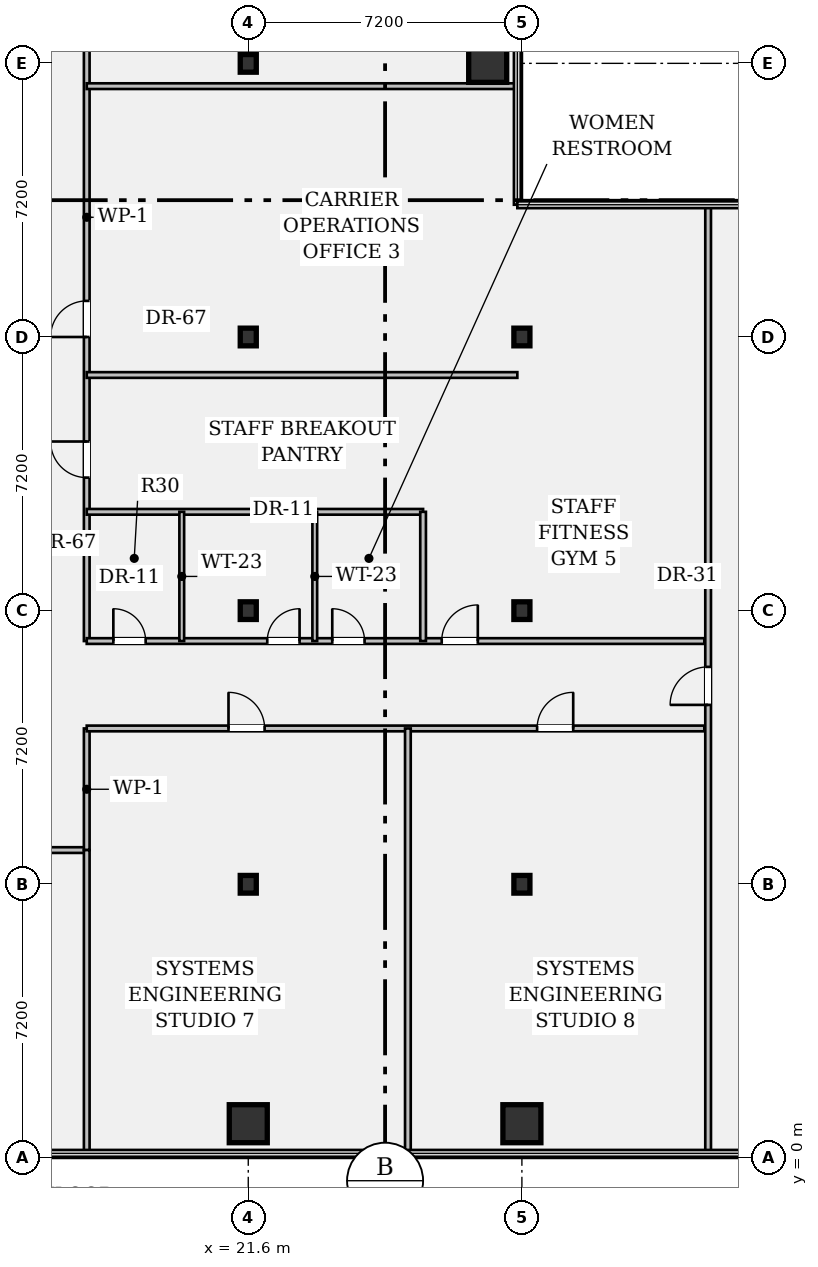
"""IFC4 building model, lengths in metres.
Left out: names, types, materials, properties, quantities, classifications, styles, units other than length and angle.
Written with IfcOpenShell. Run it as: python <this file> out.ifc"""

import sys

from ifc_helpers import new_model, si_unit, direction, frame, frame_2d, origin, origin_2d, place, context, subcontext, project, spatial, rectangle, hollow_rectangle, i_section, extrude, element, fill, save


model = new_model("IFC4")
c1 = context("Model", 3, precision=1e-05, world=origin(), true_north=direction((0.0, 1.0)))
c2 = subcontext(c1, "Body", "Model", "MODEL_VIEW")
j1 = project(units=[si_unit("LENGTHUNIT", "METRE"), si_unit("PLANEANGLEUNIT", "RADIAN")], contexts=[c1])
p1 = place(None, origin())
s1 = spatial("IfcSite", under=j1, at=p1, CompositionType="ELEMENT")
p2 = place(p1, origin())
s2 = spatial("IfcBuilding", under=s1, at=p2, CompositionType="ELEMENT")
p3 = place(p2, frame((0.0, 0.0, 65.8)))
s3 = spatial("IfcBuildingStorey", under=s2, at=p3, CompositionType="ELEMENT", Elevation=65.8)
p4 = place(p3, frame((21.6, 0.9, 0.0), z_axis=(0.0, 0.0, 1.0), x_axis=(1.0, 0.0, 0.0)))
e1 = element("IfcColumn", 1, at=p4, inside=s3, PredefinedType="COLUMN", context=c2, shape_type="SweptSolid", body=[
    extrude(hollow_rectangle(XDim=1.0, YDim=1.0, WallThickness=0.065, at=origin_2d()), origin(), (0.0, 0.0, 1.0), 3.57),
])
for number, where, z_axis, x_axis in (
    (2, (21.6, 7.2, 0.0), (0.0, 0.0, 1.0), (1.0, 0.0, 0.0)),
    (3, (21.6, 14.4, 0.0), (0.0, 0.0, 1.0), (1.0, 0.0, 0.0)),
    (4, (21.6, 21.6, 0.0), (0.0, 0.0, 1.0), (1.0, 0.0, 0.0)),
    (5, (21.6, 28.8, 0.0), (0.0, 0.0, 1.0), (1.0, 0.0, 0.0)),
):
    element("IfcColumn", number, at=place(p3, frame(where, z_axis=z_axis, x_axis=x_axis)), inside=s3, PredefinedType="COLUMN", context=c2, shape_type="SweptSolid", body=[
        extrude(i_section(OverallWidth=0.422, OverallDepth=0.465, WebThickness=0.045, FlangeThickness=0.073, FilletRadius=0.018, at=origin_2d()), origin(), (0.0, 0.0, 1.0), 3.57),
    ])
for number, where, z_axis, x_axis in (
    (6, (27.9, 28.8, 0.0), (0.0, 0.0, 1.0), (1.0, 0.0, 0.0)),
    (7, (28.8, 0.9, 0.0), (0.0, 0.0, 1.0), (1.0, 0.0, 0.0)),
):
    element("IfcColumn", number, at=place(p3, frame(where, z_axis=z_axis, x_axis=x_axis)), inside=s3, PredefinedType="COLUMN", context=c2, shape_type="SweptSolid", body=[
        extrude(hollow_rectangle(XDim=1.0, YDim=1.0, WallThickness=0.065, at=origin_2d()), origin(), (0.0, 0.0, 1.0), 3.57),
    ])
for number, where, z_axis, x_axis in (
    (8, (28.8, 7.2, 0.0), (0.0, 0.0, 1.0), (1.0, 0.0, 0.0)),
    (9, (28.8, 14.4, 0.0), (0.0, 0.0, 1.0), (1.0, 0.0, 0.0)),
    (10, (28.8, 21.6, 0.0), (0.0, 0.0, 1.0), (1.0, 0.0, 0.0)),
):
    element("IfcColumn", number, at=place(p3, frame(where, z_axis=z_axis, x_axis=x_axis)), inside=s3, PredefinedType="COLUMN", context=c2, shape_type="SweptSolid", body=[
        extrude(i_section(OverallWidth=0.422, OverallDepth=0.465, WebThickness=0.045, FlangeThickness=0.073, FilletRadius=0.018, at=origin_2d()), origin(), (0.0, 0.0, 1.0), 3.57),
    ])
p5 = place(p3, frame((14.4, 8.1, 0.0), z_axis=(0.0, 0.0, 1.0), x_axis=(1.0, 0.0, 0.0)))
e11 = element("IfcWall", 11, at=p5, inside=s3, PredefinedType="PARTITIONING", context=c2, shape_type="SweptSolid", body=[
    extrude(rectangle(XDim=2.95, YDim=0.15, at=frame_2d((1.475, 0.0))), origin(), (0.0, 0.0, 1.0), 3.088),
])
p6 = place(p5, frame((0.95, 0.0, 0.0)))
e12 = element("IfcOpeningElement", 12, at=p6, cuts=e11, PredefinedType="OPENING", context=c2, shape_type="SweptSolid", body=[
    extrude(rectangle(XDim=0.95, YDim=2.15, at=frame_2d((0.475, 1.075))), frame((0.0, 0.087, 0.0), z_axis=(0.0, -1.0, 0.0), x_axis=(1.0, 0.0, 0.0)), (0.0, 0.0, 1.0), 0.174),
])
p7 = place(p3, frame((17.35, 8.1, 0.0), z_axis=(0.0, 0.0, 1.0), x_axis=(0.0, 1.0, 0.0)))
e13 = element("IfcWall", 13, at=p7, inside=s3, PredefinedType="PARTITIONING", context=c2, shape_type="SweptSolid", body=[
    extrude(rectangle(XDim=3.2, YDim=0.15, at=frame_2d((1.6, 0.0))), origin(), (0.0, 0.0, 1.0), 3.57),
])
p8 = place(p3, frame((17.35, 13.6, 0.0), z_axis=(0.0, 0.0, 1.0), x_axis=(0.0, 1.0, 0.0)))
e14 = element("IfcWall", 14, at=p8, inside=s3, PredefinedType="PARTITIONING", context=c2, shape_type="SweptSolid", body=[
    extrude(rectangle(XDim=22.3, YDim=0.15, at=frame_2d((11.15, 0.0))), origin(), (0.0, 0.0, 1.0), 2.699),
])
p9 = place(p8, frame((4.3, 0.0, 0.0)))
e15 = element("IfcOpeningElement", 15, at=p9, cuts=e14, PredefinedType="OPENING", context=c2, shape_type="SweptSolid", body=[
    extrude(rectangle(XDim=0.95, YDim=2.15, at=frame_2d((0.475, 1.075))), frame((0.0, 0.087, 0.0), z_axis=(0.0, -1.0, 0.0), x_axis=(1.0, 0.0, 0.0)), (0.0, 0.0, 1.0), 0.174),
])
p10 = place(p8, frame((8.0, 0.0, 0.0)))
e16 = element("IfcOpeningElement", 16, at=p10, cuts=e14, PredefinedType="OPENING", context=c2, shape_type="SweptSolid", body=[
    extrude(rectangle(XDim=0.95, YDim=2.15, at=frame_2d((0.475, 1.075))), frame((0.0, 0.087, 0.0), z_axis=(0.0, -1.0, 0.0), x_axis=(1.0, 0.0, 0.0)), (0.0, 0.0, 1.0), 0.174),
])
p11 = place(p8, frame((15.6, 0.0, 0.0)))
e17 = element("IfcOpeningElement", 17, at=p11, cuts=e14, PredefinedType="OPENING", context=c2, shape_type="SweptSolid", body=[
    extrude(rectangle(XDim=0.95, YDim=2.15, at=frame_2d((0.475, 1.075))), frame((0.0, 0.087, 0.0), z_axis=(0.0, -1.0, 0.0), x_axis=(1.0, 0.0, 0.0)), (0.0, 0.0, 1.0), 0.174),
])
p12 = place(p3, frame((17.35, 11.3, 0.0), z_axis=(0.0, 0.0, 1.0), x_axis=(1.0, 0.0, 0.0)))
e18 = element("IfcWall", 18, at=p12, inside=s3, PredefinedType="PARTITIONING", context=c2, shape_type="SweptSolid", body=[
    extrude(rectangle(XDim=16.25, YDim=0.15, at=frame_2d((8.125, 0.0))), origin(), (0.0, 0.0, 1.0), 2.699),
])
p13 = place(p12, frame((3.73, 0.0, 0.0)))
e19 = element("IfcOpeningElement", 19, at=p13, cuts=e18, PredefinedType="OPENING", context=c2, shape_type="SweptSolid", body=[
    extrude(rectangle(XDim=0.95, YDim=2.15, at=frame_2d((0.475, 1.075))), frame((0.0, 0.087, 0.0), z_axis=(0.0, -1.0, 0.0), x_axis=(1.0, 0.0, 0.0)), (0.0, 0.0, 1.0), 0.174),
])
p14 = place(p12, frame((11.85, 0.0, 0.0)))
e20 = element("IfcOpeningElement", 20, at=p14, cuts=e18, PredefinedType="OPENING", context=c2, shape_type="SweptSolid", body=[
    extrude(rectangle(XDim=0.95, YDim=2.15, at=frame_2d((0.475, 1.075))), frame((0.0, 0.087, 0.0), z_axis=(0.0, -1.0, 0.0), x_axis=(1.0, 0.0, 0.0)), (0.0, 0.0, 1.0), 0.174),
])
p15 = place(p3, frame((17.35, 13.6, 0.0), z_axis=(0.0, 0.0, 1.0), x_axis=(1.0, 0.0, 0.0)))
e21 = element("IfcWall", 21, at=p15, inside=s3, PredefinedType="PARTITIONING", context=c2, shape_type="SweptSolid", body=[
    extrude(rectangle(XDim=16.25, YDim=0.15, at=frame_2d((8.125, 0.0))), origin(), (0.0, 0.0, 1.0), 2.699),
])
p16 = place(p15, frame((0.7, 0.0, 0.0)))
e22 = element("IfcOpeningElement", 22, at=p16, cuts=e21, PredefinedType="OPENING", context=c2, shape_type="SweptSolid", body=[
    extrude(rectangle(XDim=0.85, YDim=2.15, at=frame_2d((0.425, 1.075))), frame((0.0, 0.087, 0.0), z_axis=(0.0, -1.0, 0.0), x_axis=(1.0, 0.0, 0.0)), (0.0, 0.0, 1.0), 0.174),
])
p17 = place(p15, frame((4.75, 0.0, 0.0)))
e23 = element("IfcOpeningElement", 23, at=p17, cuts=e21, PredefinedType="OPENING", context=c2, shape_type="SweptSolid", body=[
    extrude(rectangle(XDim=0.85, YDim=2.15, at=frame_2d((0.425, 1.075))), frame((0.0, 0.087, 0.0), z_axis=(0.0, -1.0, 0.0), x_axis=(1.0, 0.0, 0.0)), (0.0, 0.0, 1.0), 0.174),
])
p18 = place(p15, frame((6.46, 0.0, 0.0)))
e24 = element("IfcOpeningElement", 24, at=p18, cuts=e21, PredefinedType="OPENING", context=c2, shape_type="SweptSolid", body=[
    extrude(rectangle(XDim=0.85, YDim=2.15, at=frame_2d((0.425, 1.075))), frame((0.0, 0.087, 0.0), z_axis=(0.0, -1.0, 0.0), x_axis=(1.0, 0.0, 0.0)), (0.0, 0.0, 1.0), 0.174),
])
p19 = place(p15, frame((9.34, 0.0, 0.0)))
e25 = element("IfcOpeningElement", 25, at=p19, cuts=e21, PredefinedType="OPENING", context=c2, shape_type="SweptSolid", body=[
    extrude(rectangle(XDim=0.95, YDim=2.15, at=frame_2d((0.475, 1.075))), frame((0.0, 0.087, 0.0), z_axis=(0.0, -1.0, 0.0), x_axis=(1.0, 0.0, 0.0)), (0.0, 0.0, 1.0), 0.174),
])
p20 = place(p3, frame((33.7, 0.12, 0.0), z_axis=(0.0, 0.0, 1.0), x_axis=(0.0, 1.0, 0.0)))
e26 = element("IfcWall", 26, at=p20, inside=s3, PredefinedType="PARTITIONING", context=c2, shape_type="SweptSolid", body=[
    extrude(rectangle(XDim=24.96, YDim=0.15, at=frame_2d((12.48, 0.0))), origin(), (0.0, 0.0, 1.0), 2.699),
])
p21 = place(p20, frame((11.8, 0.0, 0.0)))
e27 = element("IfcOpeningElement", 27, at=p21, cuts=e26, PredefinedType="OPENING", context=c2, shape_type="SweptSolid", body=[
    extrude(rectangle(XDim=1.0, YDim=2.15, at=frame_2d((0.5, 1.075))), frame((0.0, 0.087, 0.0), z_axis=(0.0, -1.0, 0.0), x_axis=(1.0, 0.0, 0.0)), (0.0, 0.0, 1.0), 0.174),
])
p22 = place(p3, frame((17.35, 17.0, 0.0), z_axis=(0.0, 0.0, 1.0), x_axis=(1.0, 0.0, 0.0)))
e28 = element("IfcWall", 28, at=p22, inside=s3, PredefinedType="PARTITIONING", context=c2, shape_type="SweptSolid", body=[
    extrude(rectangle(XDim=8.85, YDim=0.15, at=frame_2d((4.425, 0.0))), origin(), (0.0, 0.0, 1.0), 2.699),
])
p23 = place(p3, frame((26.2, 13.6, 0.0), z_axis=(0.0, 0.0, 1.0), x_axis=(0.0, 1.0, 0.0)))
e29 = element("IfcWall", 29, at=p23, inside=s3, PredefinedType="PARTITIONING", context=c2, shape_type="SweptSolid", body=[
    extrude(rectangle(XDim=3.4, YDim=0.15, at=frame_2d((1.7, 0.0))), origin(), (0.0, 0.0, 1.0), 2.699),
])
for number, where, z_axis, x_axis in (
    (30, (19.85, 13.6, 0.0), (0.0, 0.0, 1.0), (0.0, 1.0, 0.0)),
    (31, (23.35, 13.6, 0.0), (0.0, 0.0, 1.0), (0.0, 1.0, 0.0)),
):
    element("IfcWall", number, at=place(p3, frame(where, z_axis=z_axis, x_axis=x_axis)), inside=s3, PredefinedType="PARTITIONING", context=c2, shape_type="SweptSolid", body=[
        extrude(rectangle(XDim=3.4, YDim=0.125, at=frame_2d((1.7, 0.0))), origin(), (0.0, 0.0, 1.0), 2.699),
    ])
for number, where, z_axis, x_axis in (
    (32, (17.35, 20.6, 0.0), (0.0, 0.0, 1.0), (1.0, 0.0, 0.0)),
    (33, (17.35, 28.2, 0.0), (0.0, 0.0, 1.0), (1.0, 0.0, 0.0)),
):
    element("IfcWall", number, at=place(p3, frame(where, z_axis=z_axis, x_axis=x_axis)), inside=s3, PredefinedType="PARTITIONING", context=c2, shape_type="SweptSolid", body=[
        extrude(rectangle(XDim=11.33, YDim=0.15, at=frame_2d((5.665, 0.0))), origin(), (0.0, 0.0, 1.0), 2.699),
    ])
p24 = place(p3, frame((17.35, 0.12, 0.0), z_axis=(0.0, 0.0, 1.0), x_axis=(0.0, 1.0, 0.0)))
e34 = element("IfcWall", 34, at=p24, inside=s3, PredefinedType="PARTITIONING", context=c2, shape_type="SweptSolid", body=[
    extrude(rectangle(XDim=7.98, YDim=0.15, at=frame_2d((3.99, 0.0))), origin(), (0.0, 0.0, 1.0), 2.699),
])
p25 = place(p3, frame((25.8, 0.12, 0.0), z_axis=(0.0, 0.0, 1.0), x_axis=(0.0, 1.0, 0.0)))
e35 = element("IfcWall", 35, at=p25, inside=s3, PredefinedType="PARTITIONING", context=c2, shape_type="SweptSolid", body=[
    extrude(rectangle(XDim=11.18, YDim=0.15, at=frame_2d((5.59, 0.0))), origin(), (0.0, 0.0, 1.0), 2.699),
])
p26 = place(p16, origin())
e36 = element("IfcDoor", 36, at=p26, inside=s3, OperationType="SINGLE_SWING_LEFT", PredefinedType="DOOR", context=c2, shape_type="SweptSolid", body=[
    extrude(rectangle(XDim=0.85, YDim=2.15, at=frame_2d((0.425, 1.075))), frame((0.0, 0.025, 0.0), z_axis=(0.0, -1.0, 0.0), x_axis=(1.0, 0.0, 0.0)), (0.0, 0.0, 1.0), 0.05),
])
fill(e22, e36)
p27 = place(p17, origin())
e37 = element("IfcDoor", 37, at=p27, inside=s3, OperationType="SINGLE_SWING_RIGHT", PredefinedType="DOOR", context=c2, shape_type="SweptSolid", body=[
    extrude(rectangle(XDim=0.85, YDim=2.15, at=frame_2d((0.425, 1.075))), frame((0.0, 0.025, 0.0), z_axis=(0.0, -1.0, 0.0), x_axis=(1.0, 0.0, 0.0)), (0.0, 0.0, 1.0), 0.05),
])
fill(e23, e37)
p28 = place(p18, origin())
e38 = element("IfcDoor", 38, at=p28, inside=s3, OperationType="SINGLE_SWING_LEFT", PredefinedType="DOOR", context=c2, shape_type="SweptSolid", body=[
    extrude(rectangle(XDim=0.85, YDim=2.15, at=frame_2d((0.425, 1.075))), frame((0.0, 0.025, 0.0), z_axis=(0.0, -1.0, 0.0), x_axis=(1.0, 0.0, 0.0)), (0.0, 0.0, 1.0), 0.05),
])
fill(e24, e38)
p29 = place(p9, origin())
e39 = element("IfcDoor", 39, at=p29, inside=s3, OperationType="SINGLE_SWING_RIGHT", PredefinedType="DOOR", context=c2, shape_type="SweptSolid", body=[
    extrude(rectangle(XDim=0.95, YDim=2.15, at=frame_2d((0.475, 1.075))), frame((0.0, 0.025, 0.0), z_axis=(0.0, -1.0, 0.0), x_axis=(1.0, 0.0, 0.0)), (0.0, 0.0, 1.0), 0.05),
])
fill(e15, e39)
p30 = place(p10, origin())
e40 = element("IfcDoor", 40, at=p30, inside=s3, OperationType="SINGLE_SWING_LEFT", PredefinedType="DOOR", context=c2, shape_type="SweptSolid", body=[
    extrude(rectangle(XDim=0.95, YDim=2.15, at=frame_2d((0.475, 1.075))), frame((0.0, 0.025, 0.0), z_axis=(0.0, -1.0, 0.0), x_axis=(1.0, 0.0, 0.0)), (0.0, 0.0, 1.0), 0.05),
])
fill(e16, e40)
p31 = place(p19, origin())
e41 = element("IfcDoor", 41, at=p31, inside=s3, OperationType="SINGLE_SWING_RIGHT", PredefinedType="DOOR", context=c2, shape_type="SweptSolid", body=[
    extrude(rectangle(XDim=0.95, YDim=2.15, at=frame_2d((0.475, 1.075))), frame((0.0, 0.025, 0.0), z_axis=(0.0, -1.0, 0.0), x_axis=(1.0, 0.0, 0.0)), (0.0, 0.0, 1.0), 0.05),
])
fill(e25, e41)
p32 = place(p13, origin())
e42 = element("IfcDoor", 42, at=p32, inside=s3, OperationType="SINGLE_SWING_LEFT", PredefinedType="DOOR", context=c2, shape_type="SweptSolid", body=[
    extrude(rectangle(XDim=0.95, YDim=2.15, at=frame_2d((0.475, 1.075))), frame((0.0, 0.025, 0.0), z_axis=(0.0, -1.0, 0.0), x_axis=(1.0, 0.0, 0.0)), (0.0, 0.0, 1.0), 0.05),
])
fill(e19, e42)
p33 = place(p14, origin())
e43 = element("IfcDoor", 43, at=p33, inside=s3, OperationType="SINGLE_SWING_RIGHT", PredefinedType="DOOR", context=c2, shape_type="SweptSolid", body=[
    extrude(rectangle(XDim=0.95, YDim=2.15, at=frame_2d((0.475, 1.075))), frame((0.0, 0.025, 0.0), z_axis=(0.0, -1.0, 0.0), x_axis=(1.0, 0.0, 0.0)), (0.0, 0.0, 1.0), 0.05),
])
fill(e20, e43)
p34 = place(p21, origin())
e44 = element("IfcDoor", 44, at=p34, inside=s3, OperationType="SINGLE_SWING_LEFT", PredefinedType="DOOR", context=c2, shape_type="SweptSolid", body=[
    extrude(rectangle(XDim=1.0, YDim=2.15, at=frame_2d((0.5, 1.075))), frame((0.0, 0.025, 0.0), z_axis=(0.0, -1.0, 0.0), x_axis=(1.0, 0.0, 0.0)), (0.0, 0.0, 1.0), 0.05),
])
fill(e27, e44)
save(model, sys.argv[1])
